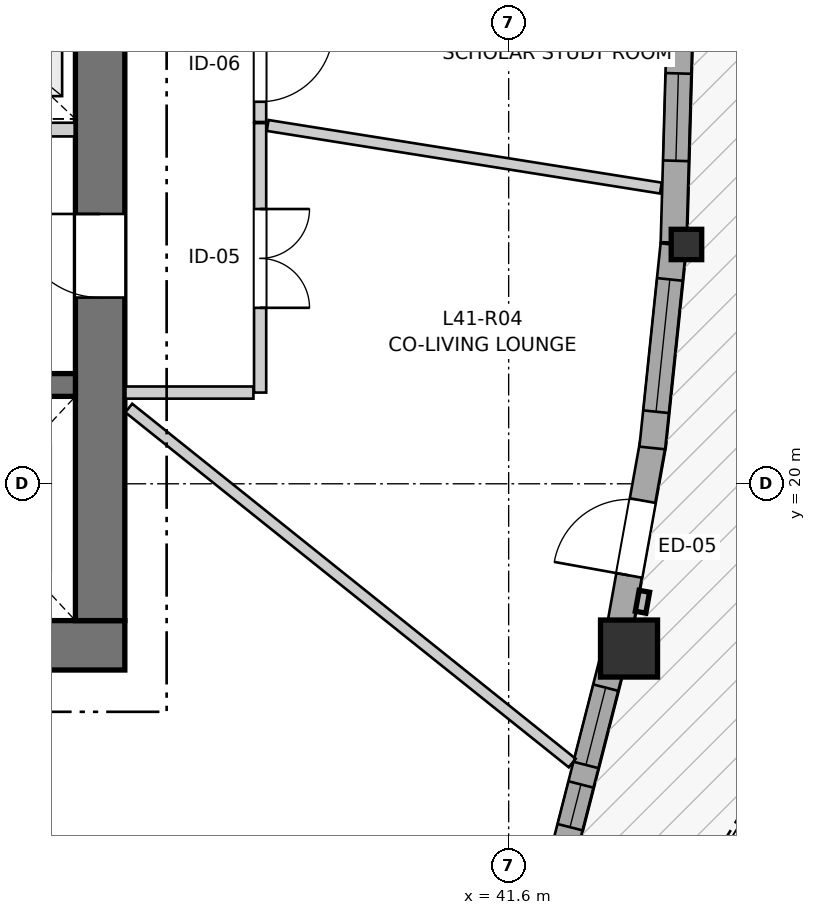
"""IFC4 building model, lengths in metres.
Left out: names, types, materials, properties, quantities, classifications, styles, units other than length and angle.
Written with IfcOpenShell. Run it as: python <this file> out.ifc"""

import sys

from ifc_helpers import new_model, si_unit, direction, frame, frame_2d, origin, origin_2d, place, context, subcontext, project, spatial, rectangle, i_section, extrude, source, transform, mapped, element, fill, save


model = new_model("IFC4")
c1 = context("Model", 3, precision=1e-05, world=origin(), true_north=direction((0.0, 1.0)))
c2 = subcontext(c1, "Body", "Model", "MODEL_VIEW")
j1 = project(units=[si_unit("LENGTHUNIT", "METRE"), si_unit("PLANEANGLEUNIT", "RADIAN")], contexts=[c1])
p1 = place(None, origin())
s1 = spatial("IfcSite", under=j1, at=p1, CompositionType="ELEMENT")
p2 = place(p1, origin())
s2 = spatial("IfcBuilding", under=s1, at=p2, CompositionType="ELEMENT")
p3 = place(p2, frame((0.0, 0.0, 139.4)))
s3 = spatial("IfcBuildingStorey", under=s2, at=p3, CompositionType="ELEMENT", Elevation=139.4)
p4 = place(p3, frame((24.15, 17.875, 0.0), z_axis=(0.0, 0.0, 1.0), x_axis=(1.0, 0.0, 0.0)))
e1 = element("IfcWall", 1, at=p4, inside=s3, PredefinedType="SHEAR", context=c2, shape_type="SweptSolid", body=[
    extrude(rectangle(XDim=12.4, YDim=0.65, at=frame_2d((6.2, 0.0))), origin(), (0.0, 0.0, 1.0), 2.95),
])
p5 = place(p3, frame((36.225, 18.2, 0.0), z_axis=(0.0, 0.0, 1.0), x_axis=(0.0, 1.0, 0.0)))
e2 = element("IfcWall", 2, at=p5, inside=s3, PredefinedType="SHEAR", context=c2, shape_type="SweptSolid", body=[
    extrude(rectangle(XDim=15.6, YDim=0.65, at=frame_2d((7.8, 0.0))), origin(), (0.0, 0.0, 1.0), 2.95),
])
p6 = place(p5, frame((4.25, 0.0, 0.0)))
e3 = element("IfcOpeningElement", 3, at=p6, cuts=e2, PredefinedType="OPENING", context=c2, shape_type="SweptSolid", body=[
    extrude(rectangle(XDim=1.1, YDim=2.15, at=frame_2d((0.55, 1.075))), frame((0.0, 0.335, 0.0), z_axis=(0.0, -1.0, 0.0), x_axis=(1.0, 0.0, 0.0)), (0.0, 0.0, 1.0), 0.67),
])
p7 = place(p5, frame((10.25, 0.0, 0.0)))
e4 = element("IfcOpeningElement", 4, at=p7, cuts=e2, PredefinedType="OPENING", context=c2, shape_type="SweptSolid", body=[
    extrude(rectangle(XDim=1.1, YDim=2.15, at=frame_2d((0.55, 1.075))), frame((0.0, 0.335, 0.0), z_axis=(0.0, -1.0, 0.0), x_axis=(1.0, 0.0, 0.0)), (0.0, 0.0, 1.0), 0.67),
])
p8 = place(p3, frame((24.8, 21.3, 0.0), z_axis=(0.0, 0.0, 1.0), x_axis=(1.0, 0.0, 0.0)))
e5 = element("IfcWall", 5, at=p8, inside=s3, PredefinedType="SHEAR", context=c2, shape_type="SweptSolid", body=[
    extrude(rectangle(XDim=11.1, YDim=0.3, at=frame_2d((5.55, 0.0))), origin(), (0.0, 0.0, 1.0), 2.95),
])
p9 = place(p8, frame((6.22, 0.0, 0.0)))
e6 = element("IfcOpeningElement", 6, at=p9, cuts=e5, PredefinedType="OPENING", context=c2, shape_type="SweptSolid", body=[
    extrude(rectangle(XDim=0.98, YDim=2.15, at=frame_2d((0.49, 1.075))), frame((0.0, 0.16, 0.0), z_axis=(0.0, -1.0, 0.0), x_axis=(1.0, 0.0, 0.0)), (0.0, 0.0, 1.0), 0.32),
])
p10 = place(p8, frame((9.15, 0.0, 0.0)))
e7 = element("IfcOpeningElement", 7, at=p10, cuts=e5, PredefinedType="OPENING", context=c2, shape_type="SweptSolid", body=[
    extrude(rectangle(XDim=1.15, YDim=2.15, at=frame_2d((0.575, 1.075))), frame((0.0, 0.16, 0.0), z_axis=(0.0, -1.0, 0.0), x_axis=(1.0, 0.0, 0.0)), (0.0, 0.0, 1.0), 0.32),
])
m1 = source(origin(), c2, "Body", "SweptSolid", [
    extrude(rectangle(XDim=0.75, YDim=0.75, at=origin_2d()), origin(), (0.0, 0.0, 1.0), 2.95),
])
p11 = place(p3, frame((43.184, 17.833, 0.0), z_axis=(0.0, 0.0, 1.0), x_axis=(1.0, 0.0, 0.0)))
e8 = element("IfcColumn", 8, at=p11, inside=s3, PredefinedType="COLUMN", context=c2, shape_type="MappedRepresentation", body=[
    mapped(m1, transform((0.0, 0.0, 0.0), x_axis=(1.0, 0.0, 0.0), y_axis=(0.0, 1.0, 0.0), z_axis=(0.0, 0.0, 1.0), scale=1.0)),
])
m2 = source(origin(), c2, "Body", "SweptSolid", [
    extrude(i_section(OverallWidth=0.401, OverallDepth=0.399, WebThickness=0.023, FlangeThickness=0.036, FilletRadius=0.015, at=origin_2d()), origin(), (0.0, 0.0, 1.0), 2.95),
])
p12 = place(p3, frame((43.939, 23.148, 0.0), z_axis=(0.0, 0.0, 1.0), x_axis=(1.0, 0.0, 0.0)))
e9 = element("IfcColumn", 9, at=p12, inside=s3, PredefinedType="PILASTER", context=c2, shape_type="MappedRepresentation", body=[
    mapped(m2, transform((0.0, 0.0, 0.0), x_axis=(1.0, 0.0, 0.0), y_axis=(0.0, 1.0, 0.0), z_axis=(0.0, 0.0, 1.0), scale=1.0)),
])
p13 = place(p3, frame((42.329, 15.177, 0.0), z_axis=(0.0, 0.0, 1.0), x_axis=(0.247819063092, 0.968806333571, 0.0)))
e10 = element("IfcWall", 10, at=p13, inside=s3, PredefinedType="SOLIDWALL", context=c2, shape_type="SweptSolid", body=[
    extrude(rectangle(XDim=2.629, YDim=0.34, at=frame_2d((1.315, 0.0))), origin(), (0.0, 0.0, 1.0), 2.53),
])
p14 = place(p13, frame((0.315, 0.0, 0.82)))
e11 = element("IfcOpeningElement", 11, at=p14, cuts=e10, PredefinedType="OPENING", context=c2, shape_type="SweptSolid", body=[
    extrude(rectangle(XDim=0.58, YDim=1.35, at=frame_2d((0.29, 0.675))), frame((0.0, 0.18, 0.0), z_axis=(0.0, -1.0, 0.0), x_axis=(1.0, 0.0, 0.0)), (0.0, 0.0, 1.0), 0.36),
])
p15 = place(p13, frame((1.16, 0.0, 0.82)))
e12 = element("IfcOpeningElement", 12, at=p15, cuts=e10, PredefinedType="OPENING", context=c2, shape_type="SweptSolid", body=[
    extrude(rectangle(XDim=1.05, YDim=1.45, at=frame_2d((0.525, 0.725))), frame((0.0, 0.18, 0.0), z_axis=(0.0, -1.0, 0.0), x_axis=(1.0, 0.0, 0.0)), (0.0, 0.0, 1.0), 0.36),
])
p16 = place(p3, frame((43.044, 18.015, 0.0), z_axis=(0.0, 0.0, 1.0), x_axis=(0.177114569603, 0.984190240367, 0.0)))
e13 = element("IfcWall", 13, at=p16, inside=s3, PredefinedType="SOLIDWALL", context=c2, shape_type="SweptSolid", body=[
    extrude(rectangle(XDim=2.584, YDim=0.34, at=frame_2d((1.292, 0.0))), origin(), (0.0, 0.0, 1.0), 2.53),
])
p17 = place(p16, frame((0.792, 0.0, 0.0)))
e14 = element("IfcOpeningElement", 14, at=p17, cuts=e13, PredefinedType="OPENING", context=c2, shape_type="SweptSolid", body=[
    extrude(rectangle(XDim=1.0, YDim=2.1, at=frame_2d((0.5, 1.05))), frame((0.0, 0.18, 0.0), z_axis=(0.0, -1.0, 0.0), x_axis=(1.0, 0.0, 0.0)), (0.0, 0.0, 1.0), 0.36),
])
p18 = place(p3, frame((43.49, 20.471, 0.0), z_axis=(0.0, 0.0, 1.0), x_axis=(0.103673439924, 0.99461139037, 0.0)))
e15 = element("IfcWall", 15, at=p18, inside=s3, PredefinedType="SOLIDWALL", context=c2, shape_type="SweptSolid", body=[
    extrude(rectangle(XDim=2.689, YDim=0.34, at=frame_2d((1.345, 0.0))), origin(), (0.0, 0.0, 1.0), 2.53),
])
p19 = place(p18, frame((0.48, 0.0, 0.82)))
e16 = element("IfcOpeningElement", 16, at=p19, cuts=e15, PredefinedType="OPENING", context=c2, shape_type="SweptSolid", body=[
    extrude(rectangle(XDim=1.75, YDim=1.3, at=frame_2d((0.875, 0.65))), frame((0.0, 0.18, 0.0), z_axis=(0.0, -1.0, 0.0), x_axis=(1.0, 0.0, 0.0)), (0.0, 0.0, 1.0), 0.36),
])
p20 = place(p3, frame((43.77, 23.173, 0.0), z_axis=(0.0, 0.0, 1.0), x_axis=(0.028392968923, 0.999596838388, 0.0)))
e17 = element("IfcWall", 17, at=p20, inside=s3, PredefinedType="SOLIDWALL", context=c2, shape_type="SweptSolid", body=[
    extrude(rectangle(XDim=2.674, YDim=0.34, at=frame_2d((1.337, 0.0))), origin(), (0.0, 0.0, 1.0), 2.53),
])
p21 = place(p20, frame((1.076, 0.0, 0.82)))
e18 = element("IfcOpeningElement", 18, at=p21, cuts=e17, PredefinedType="OPENING", context=c2, shape_type="SweptSolid", body=[
    extrude(rectangle(XDim=1.15, YDim=1.2, at=frame_2d((0.575, 0.6))), frame((0.0, 0.18, 0.0), z_axis=(0.0, -1.0, 0.0), x_axis=(1.0, 0.0, 0.0)), (0.0, 0.0, 1.0), 0.36),
])
p22 = place(p3, frame((30.67, 24.66, 0.0), z_axis=(0.0, 0.0, 1.0), x_axis=(1.0, 0.0, 0.0)))
e19 = element("IfcWall", 19, at=p22, inside=s3, PredefinedType="PARTITIONING", context=c2, shape_type="SweptSolid", body=[
    extrude(rectangle(XDim=5.22, YDim=0.18, at=frame_2d((2.61, 0.0))), origin(), (0.0, 0.0, 1.0), 2.95),
])
p23 = place(p22, frame((0.68, 0.0, 0.0)))
e20 = element("IfcOpeningElement", 20, at=p23, cuts=e19, PredefinedType="OPENING", context=c2, shape_type="SweptSolid", body=[
    extrude(rectangle(XDim=0.98, YDim=2.15, at=frame_2d((0.49, 1.075))), frame((0.0, 0.1, 0.0), z_axis=(0.0, -1.0, 0.0), x_axis=(1.0, 0.0, 0.0)), (0.0, 0.0, 1.0), 0.2),
])
p24 = place(p3, frame((38.33, 24.745, 0.0), z_axis=(0.0, 0.0, 1.0), x_axis=(0.0, -1.0, 0.0)))
e21 = element("IfcWall", 21, at=p24, inside=s3, PredefinedType="PARTITIONING", context=c2, shape_type="SweptSolid", body=[
    extrude(rectangle(XDim=3.545, YDim=0.16, at=frame_2d((1.772, 0.0))), origin(), (0.0, 0.0, 1.0), 2.95),
])
p25 = place(p24, frame((1.13, 0.0, 0.0)))
e22 = element("IfcOpeningElement", 22, at=p25, cuts=e21, PredefinedType="OPENING", context=c2, shape_type="SweptSolid", body=[
    extrude(rectangle(XDim=1.3, YDim=2.1, at=frame_2d((0.65, 1.05))), frame((0.0, 0.09, 0.0), z_axis=(0.0, -1.0, 0.0), x_axis=(1.0, 0.0, 0.0)), (0.0, 0.0, 1.0), 0.18),
])
p26 = place(p3, frame((38.33, 26.252, 0.0), z_axis=(0.0, 0.0, 1.0), x_axis=(0.0, -1.0, 0.0)))
e23 = element("IfcWall", 23, at=p26, inside=s3, PredefinedType="PARTITIONING", context=c2, shape_type="SweptSolid", body=[
    extrude(rectangle(XDim=1.492, YDim=0.16, at=frame_2d((0.746, 0.0))), origin(), (0.0, 0.0, 1.0), 2.95),
])
p27 = place(p26, frame((0.266, 0.0, 0.0)))
e24 = element("IfcOpeningElement", 24, at=p27, cuts=e23, PredefinedType="OPENING", context=c2, shape_type="SweptSolid", body=[
    extrude(rectangle(XDim=0.96, YDim=2.1, at=frame_2d((0.48, 1.05))), frame((0.0, 0.09, 0.0), z_axis=(0.0, -1.0, 0.0), x_axis=(1.0, 0.0, 0.0)), (0.0, 0.0, 1.0), 0.18),
])
p28 = place(p3, frame((36.602, 20.997, 0.0), z_axis=(0.0, 0.0, 1.0), x_axis=(0.780696683128, -0.624910144703, 0.0)))
e25 = element("IfcWall", 25, at=p28, inside=s3, PredefinedType="PARTITIONING", context=c2, shape_type="SweptSolid", body=[
    extrude(rectangle(XDim=7.474, YDim=0.145, at=frame_2d((3.737, 0.0))), origin(), (0.0, 0.0, 1.0), 2.95),
])
p29 = place(p3, frame((38.429, 24.714, 0.0), z_axis=(0.0, 0.0, 1.0), x_axis=(0.987561894046, -0.157230739454, 0.0)))
e26 = element("IfcWall", 26, at=p29, inside=s3, PredefinedType="PARTITIONING", context=c2, shape_type="SweptSolid", body=[
    extrude(rectangle(XDim=5.239, YDim=0.145, at=frame_2d((2.62, 0.0))), origin(), (0.0, 0.0, 1.0), 2.95),
])
p30 = place(p3, frame((36.558, 21.2, 0.0), z_axis=(0.0, 0.0, 1.0), x_axis=(1.0, 0.0, 0.0)))
e27 = element("IfcWall", 27, at=p30, inside=s3, PredefinedType="PARTITIONING", context=c2, shape_type="SweptSolid", body=[
    extrude(rectangle(XDim=1.684, YDim=0.16, at=frame_2d((0.842, 0.0))), origin(), (0.0, 0.0, 1.0), 2.95),
])
m3 = source(origin(), c2, "Body", "SweptSolid", [
    extrude(rectangle(XDim=0.58, YDim=1.35, at=frame_2d((0.29, 0.675))), frame((0.0, 0.03, 0.0), z_axis=(0.0, -1.0, 0.0), x_axis=(1.0, 0.0, 0.0)), (0.0, 0.0, 1.0), 0.06),
])
p31 = place(p14, origin())
e28 = element("IfcWindow", 28, at=p31, inside=s3, PartitioningType="SINGLE_PANEL", PredefinedType="WINDOW", context=c2, shape_type="MappedRepresentation", body=[
    mapped(m3, transform((0.0, 0.0, 0.0), x_axis=(1.0, 0.0, 0.0), y_axis=(0.0, 1.0, 0.0), z_axis=(0.0, 0.0, 1.0), scale=1.0)),
])
fill(e11, e28)
m4 = source(origin(), c2, "Body", "SweptSolid", [
    extrude(rectangle(XDim=1.05, YDim=1.45, at=frame_2d((0.525, 0.725))), frame((0.0, 0.03, 0.0), z_axis=(0.0, -1.0, 0.0), x_axis=(1.0, 0.0, 0.0)), (0.0, 0.0, 1.0), 0.06),
])
p32 = place(p15, origin())
e29 = element("IfcWindow", 29, at=p32, inside=s3, PartitioningType="SINGLE_PANEL", PredefinedType="WINDOW", context=c2, shape_type="MappedRepresentation", body=[
    mapped(m4, transform((0.0, 0.0, 0.0), x_axis=(1.0, 0.0, 0.0), y_axis=(0.0, 1.0, 0.0), z_axis=(0.0, 0.0, 1.0), scale=1.0)),
])
fill(e12, e29)
m5 = source(origin(), c2, "Body", "SweptSolid", [
    extrude(rectangle(XDim=1.75, YDim=1.3, at=frame_2d((0.875, 0.65))), frame((0.0, 0.03, 0.0), z_axis=(0.0, -1.0, 0.0), x_axis=(1.0, 0.0, 0.0)), (0.0, 0.0, 1.0), 0.06),
])
p33 = place(p19, origin())
e30 = element("IfcWindow", 30, at=p33, inside=s3, PartitioningType="SINGLE_PANEL", PredefinedType="WINDOW", context=c2, shape_type="MappedRepresentation", body=[
    mapped(m5, transform((0.0, 0.0, 0.0), x_axis=(1.0, 0.0, 0.0), y_axis=(0.0, 1.0, 0.0), z_axis=(0.0, 0.0, 1.0), scale=1.0)),
])
fill(e16, e30)
m6 = source(origin(), c2, "Body", "SweptSolid", [
    extrude(rectangle(XDim=1.15, YDim=1.2, at=frame_2d((0.575, 0.6))), frame((0.0, 0.03, 0.0), z_axis=(0.0, -1.0, 0.0), x_axis=(1.0, 0.0, 0.0)), (0.0, 0.0, 1.0), 0.06),
])
p34 = place(p21, origin())
e31 = element("IfcWindow", 31, at=p34, inside=s3, PartitioningType="SINGLE_PANEL", PredefinedType="WINDOW", context=c2, shape_type="MappedRepresentation", body=[
    mapped(m6, transform((0.0, 0.0, 0.0), x_axis=(1.0, 0.0, 0.0), y_axis=(0.0, 1.0, 0.0), z_axis=(0.0, 0.0, 1.0), scale=1.0)),
])
fill(e18, e31)
m7 = source(origin(), c2, "Body", "SweptSolid", [
    extrude(rectangle(XDim=1.0, YDim=2.1, at=frame_2d((0.5, 1.05))), frame((0.0, 0.025, 0.0), z_axis=(0.0, -1.0, 0.0), x_axis=(1.0, 0.0, 0.0)), (0.0, 0.0, 1.0), 0.05),
])
p35 = place(p17, origin())
e32 = element("IfcDoor", 32, at=p35, inside=s3, OperationType="SINGLE_SWING_LEFT", PredefinedType="DOOR", context=c2, shape_type="MappedRepresentation", body=[
    mapped(m7, transform((0.0, 0.0, 0.0), x_axis=(1.0, 0.0, 0.0), y_axis=(0.0, 1.0, 0.0), z_axis=(0.0, 0.0, 1.0), scale=1.0)),
])
fill(e14, e32)
m8 = source(origin(), c2, "Body", "SweptSolid", [
    extrude(rectangle(XDim=1.1, YDim=2.15, at=frame_2d((0.55, 1.075))), frame((0.0, 0.025, 0.0), z_axis=(0.0, -1.0, 0.0), x_axis=(1.0, 0.0, 0.0)), (0.0, 0.0, 1.0), 0.05),
])
p36 = place(p6, origin())
e33 = element("IfcDoor", 33, at=p36, inside=s3, OperationType="SINGLE_SWING_RIGHT", PredefinedType="DOOR", context=c2, shape_type="MappedRepresentation", body=[
    mapped(m8, transform((0.0, 0.0, 0.0), x_axis=(1.0, 0.0, 0.0), y_axis=(0.0, 1.0, 0.0), z_axis=(0.0, 0.0, 1.0), scale=1.0)),
])
fill(e3, e33)
m9 = source(origin(), c2, "Body", "SweptSolid", [
    extrude(rectangle(XDim=1.3, YDim=2.1, at=frame_2d((0.65, 1.05))), frame((0.0, 0.025, 0.0), z_axis=(0.0, -1.0, 0.0), x_axis=(1.0, 0.0, 0.0)), (0.0, 0.0, 1.0), 0.05),
])
p37 = place(p25, origin())
e34 = element("IfcDoor", 34, at=p37, inside=s3, OperationType="DOUBLE_DOOR_SINGLE_SWING", PredefinedType="DOOR", context=c2, shape_type="MappedRepresentation", body=[
    mapped(m9, transform((0.0, 0.0, 0.0), x_axis=(1.0, 0.0, 0.0), y_axis=(0.0, 1.0, 0.0), z_axis=(0.0, 0.0, 1.0), scale=1.0)),
])
fill(e22, e34)
m10 = source(origin(), c2, "Body", "SweptSolid", [
    extrude(rectangle(XDim=0.96, YDim=2.1, at=frame_2d((0.48, 1.05))), frame((0.0, 0.025, 0.0), z_axis=(0.0, -1.0, 0.0), x_axis=(1.0, 0.0, 0.0)), (0.0, 0.0, 1.0), 0.05),
])
p38 = place(p27, origin())
e35 = element("IfcDoor", 35, at=p38, inside=s3, OperationType="SINGLE_SWING_LEFT", PredefinedType="DOOR", context=c2, shape_type="MappedRepresentation", body=[
    mapped(m10, transform((0.0, 0.0, 0.0), x_axis=(1.0, 0.0, 0.0), y_axis=(0.0, 1.0, 0.0), z_axis=(0.0, 0.0, 1.0), scale=1.0)),
])
fill(e24, e35)
save(model, sys.argv[1])
